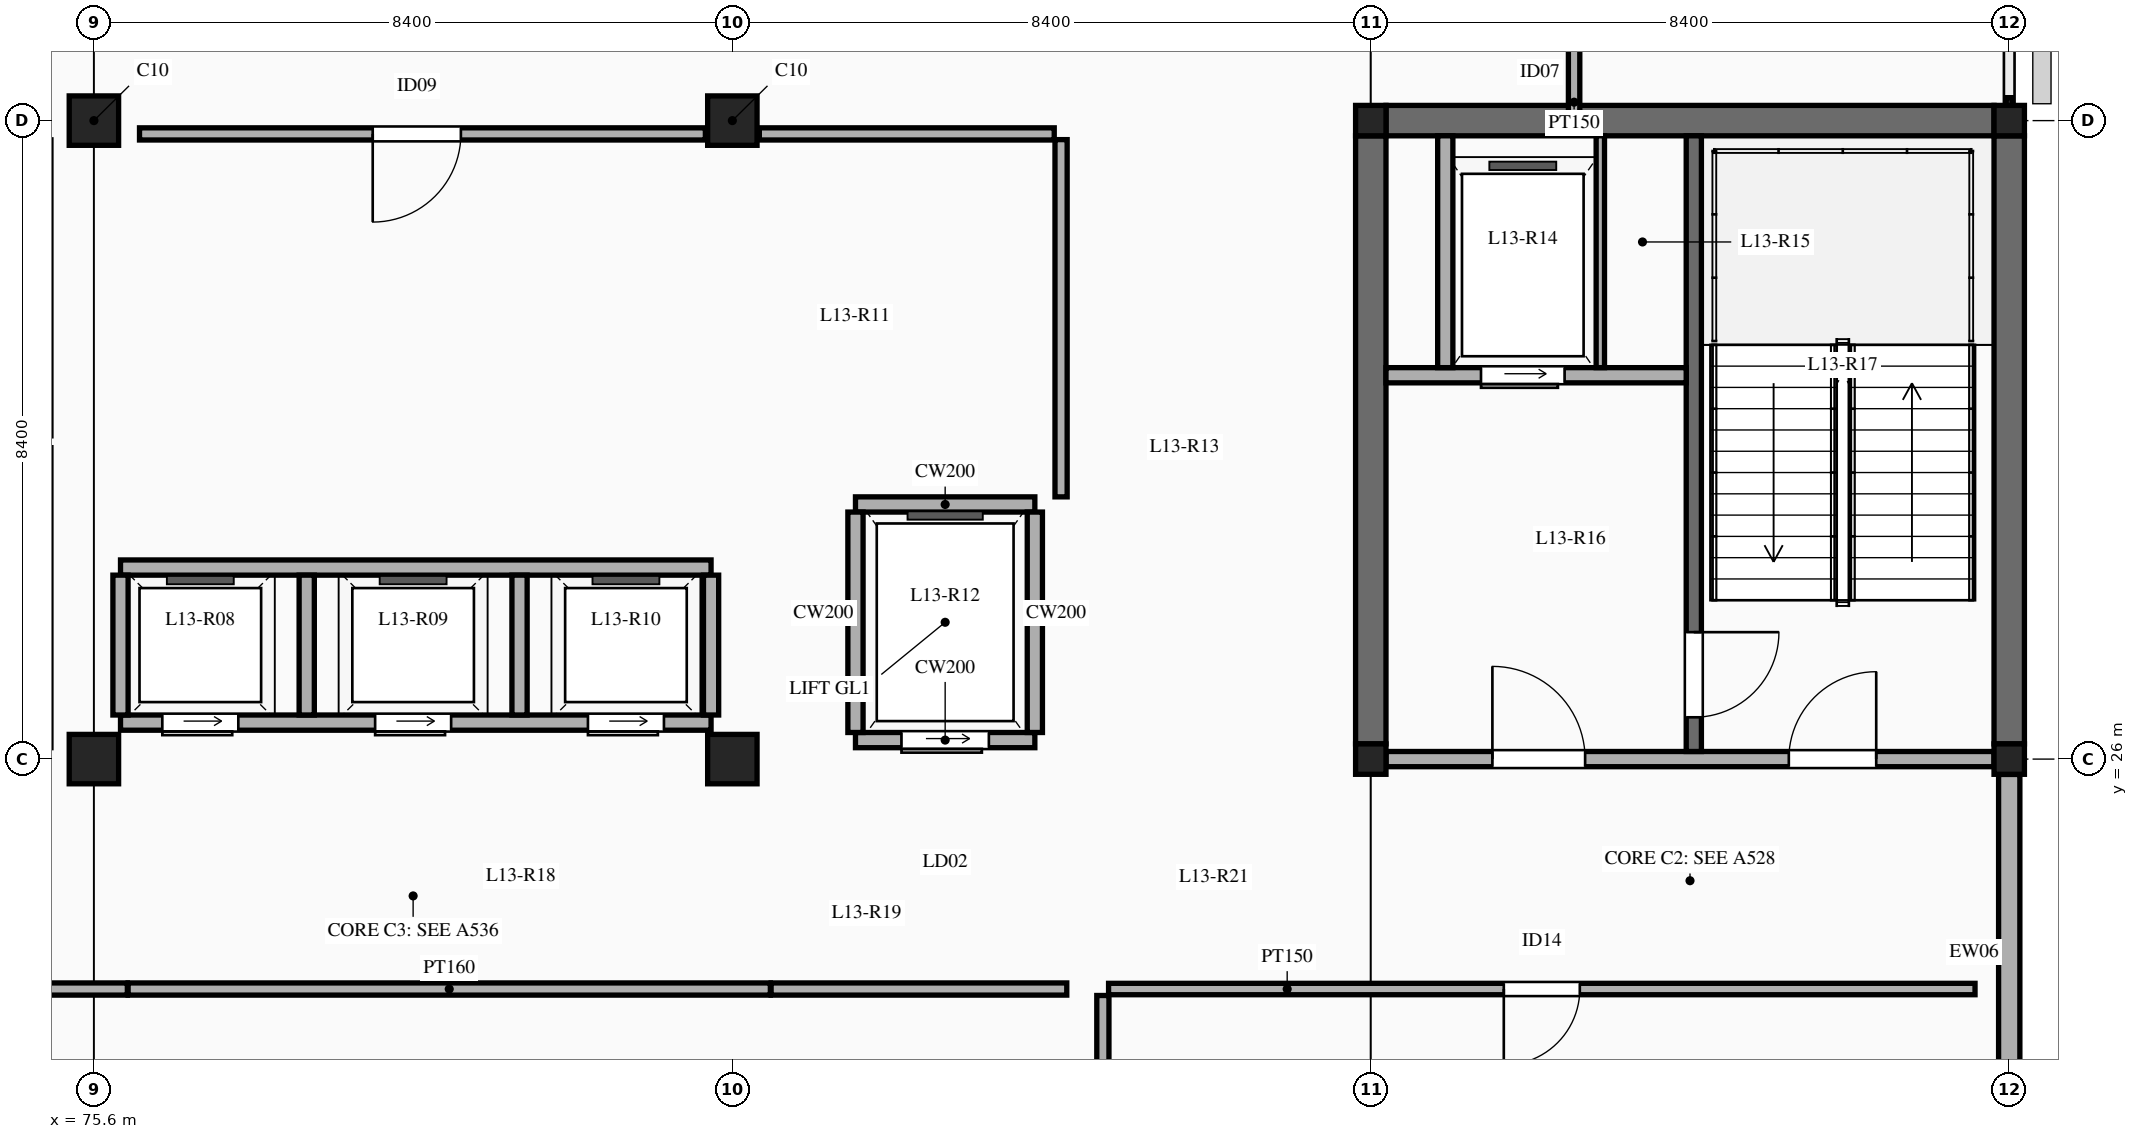
"""IFC4 building model, lengths in metres.
Left out: names, types, materials, properties, quantities, classifications, styles, units other than length and angle.
Written with IfcOpenShell. Run it as: python <this file> out.ifc"""

import sys

from ifc_helpers import new_model, si_unit, direction, frame, frame_2d, origin, origin_2d, place, context, subcontext, project, spatial, rectangle, extrude, element, fill, save


model = new_model("IFC4")
c1 = context("Model", 3, precision=1e-05, world=origin(), true_north=direction((0.0, 1.0)))
c2 = subcontext(c1, "Body", "Model", "MODEL_VIEW")
j1 = project(units=[si_unit("LENGTHUNIT", "METRE"), si_unit("PLANEANGLEUNIT", "RADIAN")], contexts=[c1])
p1 = place(None, origin())
s1 = spatial("IfcSite", under=j1, at=p1, CompositionType="ELEMENT")
p2 = place(p1, origin())
s2 = spatial("IfcBuilding", under=s1, at=p2, CompositionType="ELEMENT")
p3 = place(p2, frame((0.0, 0.0, 60.0)))
s3 = spatial("IfcBuildingStorey", under=s2, at=p3, CompositionType="ELEMENT", Elevation=60.0)
for number, where, z_axis, x_axis in (
    (1, (75.6, 26.0, 0.0), (0.0, 0.0, 1.0), (1.0, 0.0, 0.0)),
    (2, (75.6, 34.4, 0.0), (0.0, 0.0, 1.0), (1.0, 0.0, 0.0)),
    (3, (84.0, 26.0, 0.0), (0.0, 0.0, 1.0), (1.0, 0.0, 0.0)),
    (4, (84.0, 34.4, 0.0), (0.0, 0.0, 1.0), (1.0, 0.0, 0.0)),
):
    element("IfcColumn", number, at=place(p3, frame(where, z_axis=z_axis, x_axis=x_axis)), inside=s3, PredefinedType="COLUMN", context=c2, shape_type="SweptSolid", body=[
        extrude(rectangle(XDim=0.65, YDim=0.65, at=origin_2d()), origin(), (0.0, 0.0, 1.0), 4.5),
    ])
for number, where, z_axis, x_axis in (
    (5, (92.4, 26.0, 0.0), (0.0, 0.0, 1.0), (1.0, 0.0, 0.0)),
    (6, (92.4, 34.4, 0.0), (0.0, 0.0, 1.0), (1.0, 0.0, 0.0)),
    (7, (100.8, 26.0, 0.0), (0.0, 0.0, 1.0), (1.0, 0.0, 0.0)),
    (8, (100.8, 34.4, 0.0), (0.0, 0.0, 1.0), (1.0, 0.0, 0.0)),
):
    element("IfcColumn", number, at=place(p3, frame(where, z_axis=z_axis, x_axis=x_axis)), inside=s3, PredefinedType="COLUMN", context=c2, shape_type="SweptSolid", body=[
        extrude(rectangle(XDim=0.4, YDim=0.4, at=origin_2d()), origin(), (0.0, 0.0, 1.0), 4.5),
    ])
for number, where, z_axis, x_axis in (
    (9, (92.4, 26.2, 0.0), (0.0, 0.0, 1.0), (0.0, 1.0, 0.0)),
    (10, (100.8, 26.2, 0.0), (0.0, 0.0, 1.0), (0.0, 1.0, 0.0)),
    (11, (92.6, 34.4, 0.0), (0.0, 0.0, 1.0), (1.0, 0.0, 0.0)),
):
    element("IfcWall", number, at=place(p3, frame(where, z_axis=z_axis, x_axis=x_axis)), inside=s3, PredefinedType="SHEAR", context=c2, shape_type="SweptSolid", body=[
        extrude(rectangle(XDim=8.0, YDim=0.4, at=frame_2d((4.0, 0.0))), origin(), (0.0, 0.0, 1.0), 4.5),
    ])
p4 = place(p3, frame((100.8, 17.927, 0.0), z_axis=(0.0, 0.0, 1.0), x_axis=(0.0, 1.0, 0.0)))
e12 = element("IfcWall", 12, at=p4, inside=s3, PredefinedType="ELEMENTEDWALL", context=c2, shape_type="SweptSolid", body=[
    extrude(rectangle(XDim=7.871, YDim=0.28, at=frame_2d((3.936, 0.0))), origin(), (0.0, 0.0, 1.0), 3.55),
])
p5 = place(p4, frame((1.043, 0.0, 0.9)))
e13 = element("IfcOpeningElement", 13, at=p5, cuts=e12, PredefinedType="OPENING", context=c2, shape_type="SweptSolid", body=[
    extrude(rectangle(XDim=1.85, YDim=2.05, at=frame_2d((0.925, 1.025))), frame((0.0, 0.15, 0.0), z_axis=(0.0, -1.0, 0.0), x_axis=(1.0, 0.0, 0.0)), (0.0, 0.0, 1.0), 0.3),
])
p6 = place(p3, frame((92.6, 26.0, 0.0), z_axis=(0.0, 0.0, 1.0), x_axis=(1.0, 0.0, 0.0)))
e14 = element("IfcWall", 14, at=p6, inside=s3, PredefinedType="SOLIDWALL", context=c2, shape_type="SweptSolid", body=[
    extrude(rectangle(XDim=8.0, YDim=0.2, at=frame_2d((4.0, 0.0))), origin(), (0.0, 0.0, 1.0), 3.88),
])
p7 = place(p6, frame((1.4, 0.0, 0.0)))
e15 = element("IfcOpeningElement", 15, at=p7, cuts=e14, PredefinedType="OPENING", context=c2, shape_type="SweptSolid", body=[
    extrude(rectangle(XDim=1.22, YDim=2.15, at=frame_2d((0.61, 1.075))), frame((0.0, 0.11, 0.0), z_axis=(0.0, -1.0, 0.0), x_axis=(1.0, 0.0, 0.0)), (0.0, 0.0, 1.0), 0.22),
])
p8 = place(p6, frame((5.3, 0.0, 0.0)))
e16 = element("IfcOpeningElement", 16, at=p8, cuts=e14, PredefinedType="OPENING", context=c2, shape_type="SweptSolid", body=[
    extrude(rectangle(XDim=1.15, YDim=2.15, at=frame_2d((0.575, 1.075))), frame((0.0, 0.11, 0.0), z_axis=(0.0, -1.0, 0.0), x_axis=(1.0, 0.0, 0.0)), (0.0, 0.0, 1.0), 0.22),
])
p9 = place(p3, frame((96.65, 26.1, 0.0), z_axis=(0.0, 0.0, 1.0), x_axis=(0.0, 1.0, 0.0)))
e17 = element("IfcWall", 17, at=p9, inside=s3, PredefinedType="SOLIDWALL", context=c2, shape_type="SweptSolid", body=[
    extrude(rectangle(XDim=8.1, YDim=0.2, at=frame_2d((4.05, 0.0))), origin(), (0.0, 0.0, 1.0), 4.3),
])
p10 = place(p9, frame((0.45, 0.0, 0.0)))
e18 = element("IfcOpeningElement", 18, at=p10, cuts=e17, PredefinedType="OPENING", context=c2, shape_type="SweptSolid", body=[
    extrude(rectangle(XDim=1.12, YDim=2.15, at=frame_2d((0.56, 1.075))), frame((0.0, 0.11, 0.0), z_axis=(0.0, -1.0, 0.0), x_axis=(1.0, 0.0, 0.0)), (0.0, 0.0, 1.0), 0.22),
])
p11 = place(p3, frame((92.6, 31.05, 0.0), z_axis=(0.0, 0.0, 1.0), x_axis=(1.0, 0.0, 0.0)))
e19 = element("IfcWall", 19, at=p11, inside=s3, PredefinedType="SOLIDWALL", context=c2, shape_type="SweptSolid", body=[
    extrude(rectangle(XDim=3.95, YDim=0.2, at=frame_2d((1.975, 0.0))), origin(), (0.0, 0.0, 1.0), 4.3),
])
p12 = place(p11, frame((1.25, 0.0, 0.0)))
e20 = element("IfcOpeningElement", 20, at=p12, cuts=e19, PredefinedType="OPENING", context=c2, shape_type="SweptSolid", body=[
    extrude(rectangle(XDim=1.1, YDim=2.15, at=frame_2d((0.55, 1.075))), frame((0.0, 0.11, 0.0), z_axis=(0.0, -1.0, 0.0), x_axis=(1.0, 0.0, 0.0)), (0.0, 0.0, 1.0), 0.22),
])
p13 = place(p3, frame((95.42, 31.15, 0.0), z_axis=(0.0, 0.0, 1.0), x_axis=(0.0, 1.0, 0.0)))
e21 = element("IfcWall", 21, at=p13, inside=s3, PredefinedType="PARTITIONING", context=c2, shape_type="SweptSolid", body=[
    extrude(rectangle(XDim=3.05, YDim=0.11, at=frame_2d((1.525, 0.0))), origin(), (0.0, 0.0, 1.0), 4.3),
])
p14 = place(p3, frame((93.38, 31.15, 0.0), z_axis=(0.0, 0.0, 1.0), x_axis=(0.0, 1.0, 0.0)))
e22 = element("IfcWall", 22, at=p14, inside=s3, PredefinedType="SOLIDWALL", context=c2, shape_type="SweptSolid", body=[
    extrude(rectangle(XDim=3.05, YDim=0.2, at=frame_2d((1.525, 0.0))), origin(), (0.0, 0.0, 1.0), 4.3),
])
p15 = place(p3, frame((75.95, 26.48, 0.0), z_axis=(0.0, 0.0, 1.0), x_axis=(1.0, 0.0, 0.0)))
e23 = element("IfcWall", 23, at=p15, inside=s3, PredefinedType="SOLIDWALL", context=c2, shape_type="SweptSolid", body=[
    extrude(rectangle(XDim=7.77, YDim=0.2, at=frame_2d((3.885, 0.0))), origin(), (0.0, 0.0, 1.0), 4.3),
])
p16 = place(p15, frame((0.55, 0.0, 0.0)))
e24 = element("IfcOpeningElement", 24, at=p16, cuts=e23, PredefinedType="OPENING", context=c2, shape_type="SweptSolid", body=[
    extrude(rectangle(XDim=1.0, YDim=2.15, at=frame_2d((0.5, 1.075))), frame((0.0, 0.11, 0.0), z_axis=(0.0, -1.0, 0.0), x_axis=(1.0, 0.0, 0.0)), (0.0, 0.0, 1.0), 0.22),
])
p17 = place(p15, frame((3.35, 0.0, 0.0)))
e25 = element("IfcOpeningElement", 25, at=p17, cuts=e23, PredefinedType="OPENING", context=c2, shape_type="SweptSolid", body=[
    extrude(rectangle(XDim=1.0, YDim=2.15, at=frame_2d((0.5, 1.075))), frame((0.0, 0.11, 0.0), z_axis=(0.0, -1.0, 0.0), x_axis=(1.0, 0.0, 0.0)), (0.0, 0.0, 1.0), 0.22),
])
p18 = place(p15, frame((6.15, 0.0, 0.0)))
e26 = element("IfcOpeningElement", 26, at=p18, cuts=e23, PredefinedType="OPENING", context=c2, shape_type="SweptSolid", body=[
    extrude(rectangle(XDim=1.0, YDim=2.15, at=frame_2d((0.5, 1.075))), frame((0.0, 0.11, 0.0), z_axis=(0.0, -1.0, 0.0), x_axis=(1.0, 0.0, 0.0)), (0.0, 0.0, 1.0), 0.22),
])
p19 = place(p3, frame((75.95, 28.52, 0.0), z_axis=(0.0, 0.0, 1.0), x_axis=(1.0, 0.0, 0.0)))
e27 = element("IfcWall", 27, at=p19, inside=s3, PredefinedType="SOLIDWALL", context=c2, shape_type="SweptSolid", body=[
    extrude(rectangle(XDim=7.77, YDim=0.2, at=frame_2d((3.885, 0.0))), origin(), (0.0, 0.0, 1.0), 4.3),
])
for number, where, z_axis, x_axis in (
    (28, (75.95, 26.58, 0.0), (0.0, 0.0, 1.0), (0.0, 1.0, 0.0)),
    (29, (78.4, 26.58, 0.0), (0.0, 0.0, 1.0), (0.0, 1.0, 0.0)),
    (30, (81.2, 26.58, 0.0), (0.0, 0.0, 1.0), (0.0, 1.0, 0.0)),
):
    element("IfcWall", number, at=place(p3, frame(where, z_axis=z_axis, x_axis=x_axis)), inside=s3, PredefinedType="SOLIDWALL", context=c2, shape_type="SweptSolid", body=[
        extrude(rectangle(XDim=1.84, YDim=0.2, at=frame_2d((0.92, 0.0))), origin(), (0.0, 0.0, 1.0), 4.3),
    ])
p20 = place(p3, frame((83.72, 26.58, 0.0), z_axis=(0.0, 0.0, 1.0), x_axis=(0.0, 1.0, 0.0)))
e31 = element("IfcWall", 31, at=p20, inside=s3, PredefinedType="SOLIDWALL", context=c2, shape_type="SweptSolid", body=[
    extrude(rectangle(XDim=1.84, YDim=0.2, at=frame_2d((0.92, 0.0))), origin(), (0.0, 0.0, 1.0), 3.93),
])
p21 = place(p3, frame((85.62, 26.25, 0.0), z_axis=(0.0, 0.0, 1.0), x_axis=(1.0, 0.0, 0.0)))
e32 = element("IfcWall", 32, at=p21, inside=s3, PredefinedType="SOLIDWALL", context=c2, shape_type="SweptSolid", body=[
    extrude(rectangle(XDim=2.36, YDim=0.2, at=frame_2d((1.18, 0.0))), origin(), (0.0, 0.0, 1.0), 3.88),
])
p22 = place(p21, frame((0.605, 0.0, 0.0)))
e33 = element("IfcOpeningElement", 33, at=p22, cuts=e32, PredefinedType="OPENING", context=c2, shape_type="SweptSolid", body=[
    extrude(rectangle(XDim=1.15, YDim=2.2, at=frame_2d((0.575, 1.1))), frame((0.0, 0.11, 0.0), z_axis=(0.0, -1.0, 0.0), x_axis=(1.0, 0.0, 0.0)), (0.0, 0.0, 1.0), 0.22),
])
p23 = place(p3, frame((85.62, 29.35, 0.0), z_axis=(0.0, 0.0, 1.0), x_axis=(1.0, 0.0, 0.0)))
e34 = element("IfcWall", 34, at=p23, inside=s3, PredefinedType="SOLIDWALL", context=c2, shape_type="SweptSolid", body=[
    extrude(rectangle(XDim=2.36, YDim=0.2, at=frame_2d((1.18, 0.0))), origin(), (0.0, 0.0, 1.0), 4.3),
])
p24 = place(p3, frame((85.62, 26.35, 0.0), z_axis=(0.0, 0.0, 1.0), x_axis=(0.0, 1.0, 0.0)))
e35 = element("IfcWall", 35, at=p24, inside=s3, PredefinedType="SOLIDWALL", context=c2, shape_type="SweptSolid", body=[
    extrude(rectangle(XDim=2.9, YDim=0.2, at=frame_2d((1.45, 0.0))), origin(), (0.0, 0.0, 1.0), 4.3),
])
p25 = place(p3, frame((87.98, 26.35, 0.0), z_axis=(0.0, 0.0, 1.0), x_axis=(0.0, 1.0, 0.0)))
e36 = element("IfcWall", 36, at=p25, inside=s3, PredefinedType="SOLIDWALL", context=c2, shape_type="SweptSolid", body=[
    extrude(rectangle(XDim=2.9, YDim=0.2, at=frame_2d((1.45, 0.0))), origin(), (0.0, 0.0, 1.0), 4.03),
])
p26 = place(p3, frame((88.325, 29.45, 0.0), z_axis=(0.0, 0.0, 1.0), x_axis=(0.0, 1.0, 0.0)))
e37 = element("IfcWall", 37, at=p26, inside=s3, PredefinedType="PARTITIONING", context=c2, shape_type="SweptSolid", body=[
    extrude(rectangle(XDim=4.7, YDim=0.16, at=frame_2d((2.35, 0.0))), origin(), (0.0, 0.0, 1.0), 3.45),
])
p27 = place(p3, frame((76.2, 34.225, 0.0), z_axis=(0.0, 0.0, 1.0), x_axis=(1.0, 0.0, 0.0)))
e38 = element("IfcWall", 38, at=p27, inside=s3, PredefinedType="PARTITIONING", context=c2, shape_type="SweptSolid", body=[
    extrude(rectangle(XDim=7.445, YDim=0.16, at=frame_2d((3.723, 0.0))), origin(), (0.0, 0.0, 1.0), 3.45),
])
p28 = place(p27, frame((3.068, 0.0, 0.0)))
e39 = element("IfcOpeningElement", 39, at=p28, cuts=e38, PredefinedType="OPENING", context=c2, shape_type="SweptSolid", body=[
    extrude(rectangle(XDim=1.16, YDim=2.2, at=frame_2d((0.58, 1.1))), frame((0.0, 0.09, 0.0), z_axis=(0.0, -1.0, 0.0), x_axis=(1.0, 0.0, 0.0)), (0.0, 0.0, 1.0), 0.18),
])
p29 = place(p3, frame((84.355, 34.225, 0.0), z_axis=(0.0, 0.0, 1.0), x_axis=(1.0, 0.0, 0.0)))
e40 = element("IfcWall", 40, at=p29, inside=s3, PredefinedType="PARTITIONING", context=c2, shape_type="SweptSolid", body=[
    extrude(rectangle(XDim=3.88, YDim=0.16, at=frame_2d((1.94, 0.0))), origin(), (0.0, 0.0, 1.0), 3.45),
])
p30 = place(p3, frame((76.05, 22.975, 0.0), z_axis=(0.0, 0.0, 1.0), x_axis=(1.0, 0.0, 0.0)))
e41 = element("IfcWall", 41, at=p30, inside=s3, PredefinedType="PARTITIONING", context=c2, shape_type="SweptSolid", body=[
    extrude(rectangle(XDim=8.45, YDim=0.16, at=frame_2d((4.225, 0.0))), origin(), (0.0, 0.0, 1.0), 3.45),
])
p31 = place(p3, frame((84.51, 22.975, 0.0), z_axis=(0.0, 0.0, 1.0), x_axis=(1.0, 0.0, 0.0)))
e42 = element("IfcWall", 42, at=p31, inside=s3, PredefinedType="PARTITIONING", context=c2, shape_type="SweptSolid", body=[
    extrude(rectangle(XDim=3.89, YDim=0.16, at=frame_2d((1.945, 0.0))), origin(), (0.0, 0.0, 1.0), 3.45),
])
p32 = place(p3, frame((74.55, 22.975, 0.0), z_axis=(0.0, 0.0, 1.0), x_axis=(1.0, 0.0, 0.0)))
e43 = element("IfcWall", 43, at=p32, inside=s3, PredefinedType="PARTITIONING", context=c2, shape_type="SweptSolid", body=[
    extrude(rectangle(XDim=1.49, YDim=0.16, at=frame_2d((0.745, 0.0))), origin(), (0.0, 0.0, 1.0), 3.45),
])
p33 = place(p3, frame((88.95, 22.975, 0.0), z_axis=(0.0, 0.0, 1.0), x_axis=(1.0, 0.0, 0.0)))
e44 = element("IfcWall", 44, at=p33, inside=s3, PredefinedType="PARTITIONING", context=c2, shape_type="SweptSolid", body=[
    extrude(rectangle(XDim=11.4, YDim=0.15, at=frame_2d((5.7, 0.0))), origin(), (0.0, 0.0, 1.0), 3.45),
])
p34 = place(p33, frame((5.2, 0.0, 0.0)))
e45 = element("IfcOpeningElement", 45, at=p34, cuts=e44, PredefinedType="OPENING", context=c2, shape_type="SweptSolid", body=[
    extrude(rectangle(XDim=1.0, YDim=2.15, at=frame_2d((0.5, 1.075))), frame((0.0, 0.085, 0.0), z_axis=(0.0, -1.0, 0.0), x_axis=(1.0, 0.0, 0.0)), (0.0, 0.0, 1.0), 0.17),
])
p35 = place(p3, frame((88.875, 9.65, 0.0), z_axis=(0.0, 0.0, 1.0), x_axis=(0.0, 1.0, 0.0)))
e46 = element("IfcWall", 46, at=p35, inside=s3, PredefinedType="PARTITIONING", context=c2, shape_type="SweptSolid", body=[
    extrude(rectangle(XDim=13.24, YDim=0.16, at=frame_2d((6.62, 0.0))), origin(), (0.0, 0.0, 1.0), 3.45),
])
p36 = place(p3, frame((95.075, 34.3, 0.0), z_axis=(0.0, 0.0, 1.0), x_axis=(0.0, 1.0, 0.0)))
e47 = element("IfcWall", 47, at=p36, inside=s3, PredefinedType="PARTITIONING", context=c2, shape_type="SweptSolid", body=[
    extrude(rectangle(XDim=2.735, YDim=0.15, at=frame_2d((1.367, 0.0))), origin(), (0.0, 0.0, 1.0), 3.45),
])
p37 = place(p36, frame((1.185, 0.0, 0.0)))
e48 = element("IfcOpeningElement", 48, at=p37, cuts=e47, PredefinedType="OPENING", context=c2, shape_type="SweptSolid", body=[
    extrude(rectangle(XDim=1.3, YDim=2.25, at=frame_2d((0.65, 1.125))), frame((0.0, 0.085, 0.0), z_axis=(0.0, -1.0, 0.0), x_axis=(1.0, 0.0, 0.0)), (0.0, 0.0, 1.0), 0.17),
])
p38 = place(p7, origin())
e49 = element("IfcDoor", 49, at=p38, inside=s3, OperationType="SINGLE_SWING_LEFT", PredefinedType="DOOR", context=c2, shape_type="SweptSolid", body=[
    extrude(rectangle(XDim=1.22, YDim=2.15, at=frame_2d((0.61, 1.075))), frame((0.0, 0.025, 0.0), z_axis=(0.0, -1.0, 0.0), x_axis=(1.0, 0.0, 0.0)), (0.0, 0.0, 1.0), 0.05),
])
fill(e15, e49)
p39 = place(p8, origin())
e50 = element("IfcDoor", 50, at=p39, inside=s3, OperationType="SINGLE_SWING_RIGHT", PredefinedType="DOOR", context=c2, shape_type="SweptSolid", body=[
    extrude(rectangle(XDim=1.15, YDim=2.15, at=frame_2d((0.575, 1.075))), frame((0.0, 0.025, 0.0), z_axis=(0.0, -1.0, 0.0), x_axis=(1.0, 0.0, 0.0)), (0.0, 0.0, 1.0), 0.05),
])
fill(e16, e50)
p40 = place(p10, frame((1.12, 0.0, 0.0), z_axis=(0.0, 0.0, 1.0), x_axis=(-1.0, 0.0, 0.0)))
e51 = element("IfcDoor", 51, at=p40, inside=s3, OperationType="SINGLE_SWING_LEFT", PredefinedType="DOOR", context=c2, shape_type="SweptSolid", body=[
    extrude(rectangle(XDim=1.12, YDim=2.15, at=frame_2d((0.56, 1.075))), frame((0.0, 0.025, 0.0), z_axis=(0.0, -1.0, 0.0), x_axis=(1.0, 0.0, 0.0)), (0.0, 0.0, 1.0), 0.05),
])
fill(e18, e51)
p41 = place(p12, frame((1.1, 0.0, 0.0), z_axis=(0.0, 0.0, 1.0), x_axis=(-1.0, 0.0, 0.0)))
e52 = element("IfcDoor", 52, at=p41, inside=s3, OperationType="SLIDING_TO_LEFT", PredefinedType="DOOR", context=c2, shape_type="SweptSolid", body=[
    extrude(rectangle(XDim=1.1, YDim=2.15, at=frame_2d((0.55, 1.075))), frame((0.0, 0.025, 0.0), z_axis=(0.0, -1.0, 0.0), x_axis=(1.0, 0.0, 0.0)), (0.0, 0.0, 1.0), 0.05),
])
fill(e20, e52)
p42 = place(p16, frame((1.0, 0.0, 0.0), z_axis=(0.0, 0.0, 1.0), x_axis=(-1.0, 0.0, 0.0)))
e53 = element("IfcDoor", 53, at=p42, inside=s3, OperationType="SLIDING_TO_LEFT", PredefinedType="DOOR", context=c2, shape_type="SweptSolid", body=[
    extrude(rectangle(XDim=1.0, YDim=2.15, at=frame_2d((0.5, 1.075))), frame((0.0, 0.025, 0.0), z_axis=(0.0, -1.0, 0.0), x_axis=(1.0, 0.0, 0.0)), (0.0, 0.0, 1.0), 0.05),
])
fill(e24, e53)
p43 = place(p17, frame((1.0, 0.0, 0.0), z_axis=(0.0, 0.0, 1.0), x_axis=(-1.0, 0.0, 0.0)))
e54 = element("IfcDoor", 54, at=p43, inside=s3, OperationType="SLIDING_TO_LEFT", PredefinedType="DOOR", context=c2, shape_type="SweptSolid", body=[
    extrude(rectangle(XDim=1.0, YDim=2.15, at=frame_2d((0.5, 1.075))), frame((0.0, 0.025, 0.0), z_axis=(0.0, -1.0, 0.0), x_axis=(1.0, 0.0, 0.0)), (0.0, 0.0, 1.0), 0.05),
])
fill(e25, e54)
p44 = place(p18, frame((1.0, 0.0, 0.0), z_axis=(0.0, 0.0, 1.0), x_axis=(-1.0, 0.0, 0.0)))
e55 = element("IfcDoor", 55, at=p44, inside=s3, OperationType="SLIDING_TO_LEFT", PredefinedType="DOOR", context=c2, shape_type="SweptSolid", body=[
    extrude(rectangle(XDim=1.0, YDim=2.15, at=frame_2d((0.5, 1.075))), frame((0.0, 0.025, 0.0), z_axis=(0.0, -1.0, 0.0), x_axis=(1.0, 0.0, 0.0)), (0.0, 0.0, 1.0), 0.05),
])
fill(e26, e55)
p45 = place(p22, frame((1.15, 0.0, 0.0), z_axis=(0.0, 0.0, 1.0), x_axis=(-1.0, 0.0, 0.0)))
e56 = element("IfcDoor", 56, at=p45, inside=s3, OperationType="SLIDING_TO_LEFT", PredefinedType="DOOR", context=c2, shape_type="SweptSolid", body=[
    extrude(rectangle(XDim=1.15, YDim=2.2, at=frame_2d((0.575, 1.1))), frame((0.0, 0.025, 0.0), z_axis=(0.0, -1.0, 0.0), x_axis=(1.0, 0.0, 0.0)), (0.0, 0.0, 1.0), 0.05),
])
fill(e33, e56)
p46 = place(p28, frame((1.16, 0.0, 0.0), z_axis=(0.0, 0.0, 1.0), x_axis=(-1.0, 0.0, 0.0)))
e57 = element("IfcDoor", 57, at=p46, inside=s3, OperationType="SINGLE_SWING_RIGHT", PredefinedType="DOOR", context=c2, shape_type="SweptSolid", body=[
    extrude(rectangle(XDim=1.16, YDim=2.2, at=frame_2d((0.58, 1.1))), frame((0.0, 0.025, 0.0), z_axis=(0.0, -1.0, 0.0), x_axis=(1.0, 0.0, 0.0)), (0.0, 0.0, 1.0), 0.05),
])
fill(e39, e57)
p47 = place(p34, frame((1.0, 0.0, 0.0), z_axis=(0.0, 0.0, 1.0), x_axis=(-1.0, 0.0, 0.0)))
e58 = element("IfcDoor", 58, at=p47, inside=s3, OperationType="SINGLE_SWING_RIGHT", PredefinedType="DOOR", context=c2, shape_type="SweptSolid", body=[
    extrude(rectangle(XDim=1.0, YDim=2.15, at=frame_2d((0.5, 1.075))), frame((0.0, 0.025, 0.0), z_axis=(0.0, -1.0, 0.0), x_axis=(1.0, 0.0, 0.0)), (0.0, 0.0, 1.0), 0.05),
])
fill(e45, e58)
save(model, sys.argv[1])
